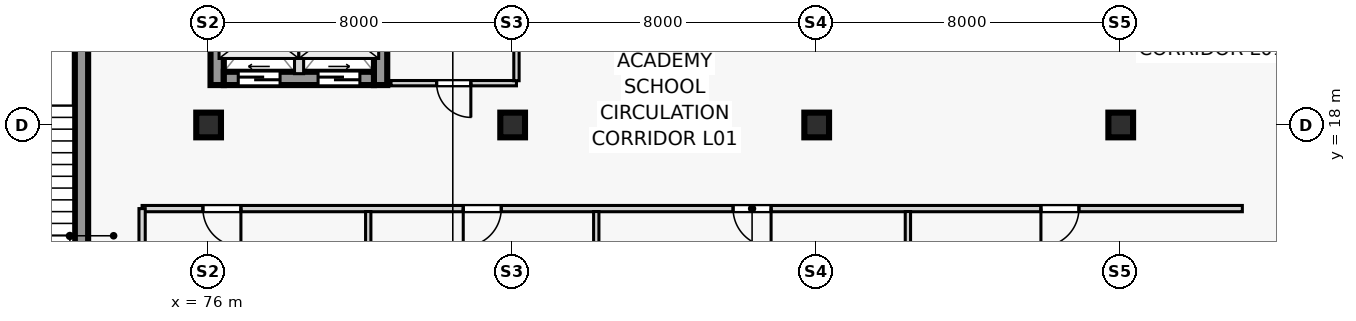
"""IFC4 building model, lengths in metres.
Left out: names, types, materials, properties, quantities, classifications, styles, units other than length and angle.
Written with IfcOpenShell. Run it as: python <this file> out.ifc"""

import sys

from ifc_helpers import new_model, si_unit, direction, frame, frame_2d, origin, origin_2d, place, context, subcontext, project, spatial, rectangle, extrude, source, transform, mapped, element, fill, save


model = new_model("IFC4")
c1 = context("Model", 3, precision=1e-05, world=origin(), true_north=direction((0.0, 1.0)))
c2 = subcontext(c1, "Body", "Model", "MODEL_VIEW")
j1 = project(units=[si_unit("LENGTHUNIT", "METRE"), si_unit("PLANEANGLEUNIT", "RADIAN")], contexts=[c1])
p1 = place(None, origin())
s1 = spatial("IfcSite", under=j1, at=p1, CompositionType="ELEMENT")
p2 = place(p1, origin())
s2 = spatial("IfcBuilding", under=s1, at=p2, CompositionType="ELEMENT")
p3 = place(p2, frame((0.0, 0.0, 4.5)))
s3 = spatial("IfcBuildingStorey", under=s2, at=p3, CompositionType="ELEMENT", Elevation=4.5)
p4 = place(p3, frame((72.655, 12.57, 0.0), z_axis=(0.0, 0.0, 1.0), x_axis=(0.0, 1.0, 0.0)))
e1 = element("IfcWall", 1, at=p4, inside=s3, PredefinedType="SHEAR", context=c2, shape_type="SweptSolid", body=[
    extrude(rectangle(XDim=9.06, YDim=0.35, at=frame_2d((4.53, 0.0))), origin(), (0.0, 0.0, 1.0), 4.5),
])
p5 = place(p4, frame((0.55, 0.0, 0.0)))
e2 = element("IfcOpeningElement", 2, at=p5, cuts=e1, PredefinedType="OPENING", context=c2, shape_type="SweptSolid", body=[
    extrude(rectangle(XDim=1.1, YDim=2.2, at=frame_2d((0.55, 1.1))), frame((0.0, 0.185, 0.0), z_axis=(0.0, -1.0, 0.0), x_axis=(1.0, 0.0, 0.0)), (0.0, 0.0, 1.0), 0.37),
])
for number, where, z_axis, x_axis in (
    (3, (76.225, 19.05, 0.0), (0.0, 0.0, 1.0), (0.0, 1.0, 0.0)),
    (4, (80.525, 19.05, 0.0), (0.0, 0.0, 1.0), (0.0, 1.0, 0.0)),
):
    element("IfcWall", number, at=place(p3, frame(where, z_axis=z_axis, x_axis=x_axis)), inside=s3, PredefinedType="SHEAR", context=c2, shape_type="SweptSolid", body=[
        extrude(rectangle(XDim=3.0, YDim=0.35, at=frame_2d((1.5, 0.0))), origin(), (0.0, 0.0, 1.0), 4.5),
    ])
p6 = place(p3, frame((76.4, 19.225, 0.0), z_axis=(0.0, 0.0, 1.0), x_axis=(1.0, 0.0, 0.0)))
e5 = element("IfcWall", 5, at=p6, inside=s3, PredefinedType="SHEAR", context=c2, shape_type="SweptSolid", body=[
    extrude(rectangle(XDim=3.95, YDim=0.35, at=frame_2d((1.975, 0.0))), origin(), (0.0, 0.0, 1.0), 4.5),
])
p7 = place(p6, frame((0.38, 0.0, 0.0)))
e6 = element("IfcOpeningElement", 6, at=p7, cuts=e5, PredefinedType="OPENING", context=c2, shape_type="SweptSolid", body=[
    extrude(rectangle(XDim=1.1, YDim=2.2, at=frame_2d((0.55, 1.1))), frame((0.0, 0.185, 0.0), z_axis=(0.0, -1.0, 0.0), x_axis=(1.0, 0.0, 0.0)), (0.0, 0.0, 1.0), 0.37),
])
p8 = place(p6, frame((2.48, 0.0, 0.0)))
e7 = element("IfcOpeningElement", 7, at=p8, cuts=e5, PredefinedType="OPENING", context=c2, shape_type="SweptSolid", body=[
    extrude(rectangle(XDim=1.1, YDim=2.2, at=frame_2d((0.55, 1.1))), frame((0.0, 0.185, 0.0), z_axis=(0.0, -1.0, 0.0), x_axis=(1.0, 0.0, 0.0)), (0.0, 0.0, 1.0), 0.37),
])
m1 = source(origin(), c2, "Body", "SweptSolid", [
    extrude(rectangle(XDim=0.65, YDim=0.65, at=origin_2d()), origin(), (0.0, 0.0, 1.0), 4.5),
])
for number, where, z_axis, x_axis in (
    (8, (76.0, 18.0, 0.0), (0.0, 0.0, 1.0), (1.0, 0.0, 0.0)),
    (9, (84.0, 18.0, 0.0), (0.0, 0.0, 1.0), (1.0, 0.0, 0.0)),
    (10, (92.0, 18.0, 0.0), (0.0, 0.0, 1.0), (1.0, 0.0, 0.0)),
    (11, (100.0, 18.0, 0.0), (0.0, 0.0, 1.0), (1.0, 0.0, 0.0)),
):
    element("IfcColumn", number, at=place(p3, frame(where, z_axis=z_axis, x_axis=x_axis)), inside=s3, PredefinedType="COLUMN", context=c2, shape_type="MappedRepresentation", body=[
        mapped(m1, transform((0.0, 0.0, 0.0), scale=1.0)),
    ])
p9 = place(p3, frame((78.38, 19.35, 0.0), z_axis=(0.0, 0.0, 1.0), x_axis=(0.0, 1.0, 0.0)))
e12 = element("IfcWall", 12, at=p9, inside=s3, PredefinedType="PARTITIONING", context=c2, shape_type="SweptSolid", body=[
    extrude(rectangle(XDim=2.4, YDim=0.24, at=frame_2d((1.2, 0.0))), origin(), (0.0, 0.0, 1.0), 4.2),
])
p10 = place(p3, frame((74.25, 15.8, 0.0), z_axis=(0.0, 0.0, 1.0), x_axis=(1.0, 0.0, 0.0)))
e13 = element("IfcWall", 13, at=p10, inside=s3, PredefinedType="PARTITIONING", context=c2, shape_type="SweptSolid", body=[
    extrude(rectangle(XDim=28.95, YDim=0.165, at=frame_2d((14.475, 0.0))), origin(), (0.0, 0.0, 1.0), 4.2),
])
p11 = place(p10, frame((1.6, 0.0, 0.0)))
e14 = element("IfcOpeningElement", 14, at=p11, cuts=e13, PredefinedType="OPENING", context=c2, shape_type="SweptSolid", body=[
    extrude(rectangle(XDim=1.0, YDim=2.15, at=frame_2d((0.5, 1.075))), frame((0.0, 0.093, 0.0), z_axis=(0.0, -1.0, 0.0), x_axis=(1.0, 0.0, 0.0)), (0.0, 0.0, 1.0), 0.185),
])
p12 = place(p10, frame((8.45, 0.0, 0.0)))
e15 = element("IfcOpeningElement", 15, at=p12, cuts=e13, PredefinedType="OPENING", context=c2, shape_type="SweptSolid", body=[
    extrude(rectangle(XDim=1.0, YDim=2.15, at=frame_2d((0.5, 1.075))), frame((0.0, 0.093, 0.0), z_axis=(0.0, -1.0, 0.0), x_axis=(1.0, 0.0, 0.0)), (0.0, 0.0, 1.0), 0.185),
])
p13 = place(p10, frame((15.55, 0.0, 0.0)))
e16 = element("IfcOpeningElement", 16, at=p13, cuts=e13, PredefinedType="OPENING", context=c2, shape_type="SweptSolid", body=[
    extrude(rectangle(XDim=1.0, YDim=2.15, at=frame_2d((0.5, 1.075))), frame((0.0, 0.093, 0.0), z_axis=(0.0, -1.0, 0.0), x_axis=(1.0, 0.0, 0.0)), (0.0, 0.0, 1.0), 0.185),
])
p14 = place(p10, frame((23.65, 0.0, 0.0)))
e17 = element("IfcOpeningElement", 17, at=p14, cuts=e13, PredefinedType="OPENING", context=c2, shape_type="SweptSolid", body=[
    extrude(rectangle(XDim=1.0, YDim=2.15, at=frame_2d((0.5, 1.075))), frame((0.0, 0.093, 0.0), z_axis=(0.0, -1.0, 0.0), x_axis=(1.0, 0.0, 0.0)), (0.0, 0.0, 1.0), 0.185),
])
p15 = place(p3, frame((80.8, 19.1, 0.0), z_axis=(0.0, 0.0, 1.0), x_axis=(1.0, 0.0, 0.0)))
e18 = element("IfcWall", 18, at=p15, inside=s3, PredefinedType="PLUMBINGWALL", context=c2, shape_type="SweptSolid", body=[
    extrude(rectangle(XDim=3.3, YDim=0.14, at=frame_2d((1.65, 0.0))), origin(), (0.0, 0.0, 1.0), 4.2),
])
p16 = place(p15, frame((1.2, 0.0, 0.0)))
e19 = element("IfcOpeningElement", 19, at=p16, cuts=e18, PredefinedType="OPENING", context=c2, shape_type="SweptSolid", body=[
    extrude(rectangle(XDim=0.9, YDim=2.1, at=frame_2d((0.45, 1.05))), frame((0.0, 0.08, 0.0), z_axis=(0.0, -1.0, 0.0), x_axis=(1.0, 0.0, 0.0)), (0.0, 0.0, 1.0), 0.16),
])
p17 = place(p3, frame((84.1, 19.165, 0.0), z_axis=(0.0, 0.0, 1.0), x_axis=(0.0, 1.0, 0.0)))
e20 = element("IfcWall", 20, at=p17, inside=s3, PredefinedType="PLUMBINGWALL", context=c2, shape_type="SweptSolid", body=[
    extrude(rectangle(XDim=3.958, YDim=0.14, at=frame_2d((1.979, 0.0))), origin(), (0.0, 0.0, 1.0), 3.45),
])
for number, where, z_axis, x_axis in (
    (21, (80.2, 6.185, 0.0), (0.0, 0.0, 1.0), (0.0, 1.0, 0.0)),
    (22, (86.2, 6.185, 0.0), (0.0, 0.0, 1.0), (0.0, 1.0, 0.0)),
    (23, (94.4, 6.185, 0.0), (0.0, 0.0, 1.0), (0.0, 1.0, 0.0)),
):
    element("IfcWall", number, at=place(p3, frame(where, z_axis=z_axis, x_axis=x_axis)), inside=s3, PredefinedType="PARTITIONING", context=c2, shape_type="SweptSolid", body=[
        extrude(rectangle(XDim=9.537, YDim=0.14, at=frame_2d((4.769, 0.0))), origin(), (0.0, 0.0, 1.0), 4.2),
    ])
p18 = place(p3, frame((74.25, 6.185, 0.0), z_axis=(0.0, 0.0, 1.0), x_axis=(0.0, 1.0, 0.0)))
e24 = element("IfcWall", 24, at=p18, inside=s3, PredefinedType="PARTITIONING", context=c2, shape_type="SweptSolid", body=[
    extrude(rectangle(XDim=9.615, YDim=0.165, at=frame_2d((4.808, 0.0))), origin(), (0.0, 0.0, 1.0), 4.2),
])
m2 = source(origin(), c2, "Body", "SweptSolid", [
    extrude(rectangle(XDim=1.1, YDim=2.2, at=frame_2d((0.55, 1.1))), frame((0.0, 0.025, 0.0), z_axis=(0.0, -1.0, 0.0), x_axis=(1.0, 0.0, 0.0)), (0.0, 0.0, 1.0), 0.05),
])
p19 = place(p7, origin())
e25 = element("IfcDoor", 25, at=p19, inside=s3, OperationType="SLIDING_TO_LEFT", PredefinedType="DOOR", context=c2, shape_type="MappedRepresentation", body=[
    mapped(m2, transform((0.0, 0.0, 0.0), scale=1.0)),
])
fill(e6, e25)
p20 = place(p8, origin())
e26 = element("IfcDoor", 26, at=p20, inside=s3, OperationType="SLIDING_TO_RIGHT", PredefinedType="DOOR", context=c2, shape_type="MappedRepresentation", body=[
    mapped(m2, transform((0.0, 0.0, 0.0), scale=1.0)),
])
fill(e7, e26)
m3 = source(origin(), c2, "Body", "SweptSolid", [
    extrude(rectangle(XDim=0.9, YDim=2.1, at=frame_2d((0.45, 1.05))), frame((0.0, 0.025, 0.0), z_axis=(0.0, -1.0, 0.0), x_axis=(1.0, 0.0, 0.0)), (0.0, 0.0, 1.0), 0.05),
])
p21 = place(p16, frame((0.9, 0.0, 0.0), z_axis=(0.0, 0.0, 1.0), x_axis=(-1.0, 0.0, 0.0)))
e27 = element("IfcDoor", 27, at=p21, inside=s3, OperationType="SINGLE_SWING_LEFT", PredefinedType="DOOR", context=c2, shape_type="MappedRepresentation", body=[
    mapped(m3, transform((0.0, 0.0, 0.0), scale=1.0)),
])
fill(e19, e27)
m4 = source(origin(), c2, "Body", "SweptSolid", [
    extrude(rectangle(XDim=1.0, YDim=2.15, at=frame_2d((0.5, 1.075))), frame((0.0, 0.025, 0.0), z_axis=(0.0, -1.0, 0.0), x_axis=(1.0, 0.0, 0.0)), (0.0, 0.0, 1.0), 0.05),
])
p22 = place(p11, frame((1.0, 0.0, 0.0), z_axis=(0.0, 0.0, 1.0), x_axis=(-1.0, 0.0, 0.0)))
e28 = element("IfcDoor", 28, at=p22, inside=s3, OperationType="SINGLE_SWING_LEFT", PredefinedType="DOOR", context=c2, shape_type="MappedRepresentation", body=[
    mapped(m4, transform((0.0, 0.0, 0.0), scale=1.0)),
])
fill(e14, e28)
p23 = place(p12, frame((1.0, 0.0, 0.0), z_axis=(0.0, 0.0, 1.0), x_axis=(-1.0, 0.0, 0.0)))
e29 = element("IfcDoor", 29, at=p23, inside=s3, OperationType="SINGLE_SWING_RIGHT", PredefinedType="DOOR", context=c2, shape_type="MappedRepresentation", body=[
    mapped(m4, transform((0.0, 0.0, 0.0), scale=1.0)),
])
fill(e15, e29)
p24 = place(p13, frame((1.0, 0.0, 0.0), z_axis=(0.0, 0.0, 1.0), x_axis=(-1.0, 0.0, 0.0)))
e30 = element("IfcDoor", 30, at=p24, inside=s3, OperationType="SINGLE_SWING_LEFT", PredefinedType="DOOR", context=c2, shape_type="MappedRepresentation", body=[
    mapped(m4, transform((0.0, 0.0, 0.0), scale=1.0)),
])
fill(e16, e30)
p25 = place(p14, frame((1.0, 0.0, 0.0), z_axis=(0.0, 0.0, 1.0), x_axis=(-1.0, 0.0, 0.0)))
e31 = element("IfcDoor", 31, at=p25, inside=s3, OperationType="SINGLE_SWING_RIGHT", PredefinedType="DOOR", context=c2, shape_type="MappedRepresentation", body=[
    mapped(m4, transform((0.0, 0.0, 0.0), scale=1.0)),
])
fill(e17, e31)
save(model, sys.argv[1])
